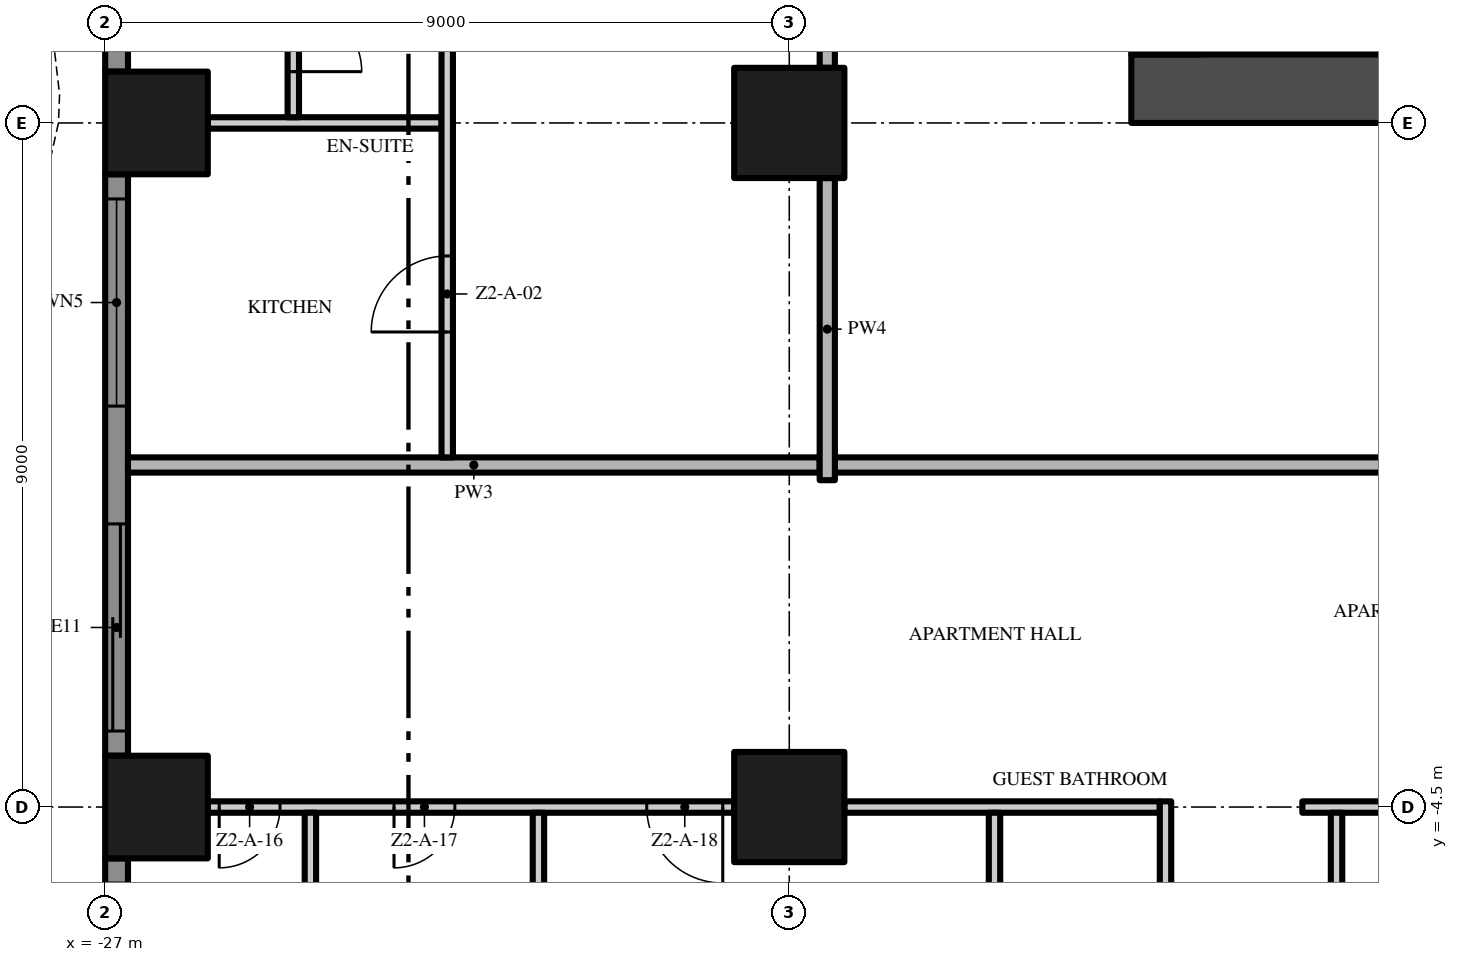
"""IFC4 building model, lengths in metres.
Left out: names, types, materials, properties, quantities, classifications, styles, units other than length and angle.
Written with IfcOpenShell. Run it as: python <this file> out.ifc"""

import sys

from ifc_helpers import new_model, si_unit, direction, frame, frame_2d, origin, origin_2d, place, context, subcontext, project, spatial, polyline, rectangle, outline, extrude, element, fill, save


model = new_model("IFC4")
c1 = context("Model", 3, precision=1e-05, world=origin(), true_north=direction((0.0, 1.0)))
c2 = subcontext(c1, "Body", "Model", "MODEL_VIEW")
j1 = project(units=[si_unit("LENGTHUNIT", "METRE"), si_unit("PLANEANGLEUNIT", "RADIAN")], contexts=[c1])
p1 = place(None, origin())
s1 = spatial("IfcSite", under=j1, at=p1, CompositionType="ELEMENT")
p2 = place(p1, origin())
s2 = spatial("IfcBuilding", under=s1, at=p2, CompositionType="ELEMENT")
p3 = place(p2, frame((0.0, 0.0, 73.2)))
s3 = spatial("IfcBuildingStorey", under=s2, at=p3, CompositionType="ELEMENT", Elevation=73.2)
p4 = place(p3, frame((-13.5, 4.95, -0.3), z_axis=(0.0, 0.0, 1.0), x_axis=(1.0, 0.0, 0.0)))
e1 = element("IfcWall", 1, at=p4, inside=s3, PredefinedType="SHEAR", context=c2, shape_type="SweptSolid", body=[
    extrude(rectangle(XDim=27.0, YDim=0.9, at=frame_2d((13.5, 0.0))), origin(), (0.0, 0.0, 1.0), 3.8),
])
p5 = place(p4, frame((12.0, 0.0, 0.3)))
e2 = element("IfcOpeningElement", 2, at=p5, cuts=e1, PredefinedType="OPENING", context=c2, shape_type="SweptSolid", body=[
    extrude(rectangle(XDim=3.0, YDim=2.4, at=frame_2d((1.5, 1.2))), frame((0.0, 0.46, 0.0), z_axis=(0.0, -1.0, 0.0), x_axis=(1.0, 0.0, 0.0)), (0.0, 0.0, 1.0), 0.92),
])
p6 = place(p4, frame((4.9, 0.0, 0.3)))
e3 = element("IfcOpeningElement", 3, at=p6, cuts=e1, PredefinedType="OPENING", context=c2, shape_type="SweptSolid", body=[
    extrude(rectangle(XDim=1.2, YDim=2.2, at=frame_2d((0.6, 1.1))), frame((0.0, 0.46, 0.0), z_axis=(0.0, -1.0, 0.0), x_axis=(1.0, 0.0, 0.0)), (0.0, 0.0, 1.0), 0.92),
])
p7 = place(p4, frame((20.75, 0.0, 0.3)))
e4 = element("IfcOpeningElement", 4, at=p7, cuts=e1, PredefinedType="OPENING", context=c2, shape_type="SweptSolid", body=[
    extrude(rectangle(XDim=1.5, YDim=2.2, at=frame_2d((0.75, 1.1))), frame((0.0, 0.46, 0.0), z_axis=(0.0, -1.0, 0.0), x_axis=(1.0, 0.0, 0.0)), (0.0, 0.0, 1.0), 0.92),
])
p8 = place(p4, frame((17.4, 0.0, 0.3)))
e5 = element("IfcOpeningElement", 5, at=p8, cuts=e1, PredefinedType="OPENING", context=c2, shape_type="SweptSolid", body=[
    extrude(rectangle(XDim=1.2, YDim=2.2, at=frame_2d((0.6, 1.1))), frame((0.0, 0.46, 0.0), z_axis=(0.0, -1.0, 0.0), x_axis=(1.0, 0.0, 0.0)), (0.0, 0.0, 1.0), 0.92),
])
p9 = place(p3, frame((-13.05, 21.6, -0.3), z_axis=(0.0, 0.0, 1.0), x_axis=(0.0, -1.0, 0.0)))
e6 = element("IfcWall", 6, at=p9, inside=s3, PredefinedType="SHEAR", context=c2, shape_type="SweptSolid", body=[
    extrude(rectangle(XDim=16.2, YDim=0.9, at=frame_2d((8.1, 0.0))), origin(), (0.0, 0.0, 1.0), 3.8),
])
p10 = place(p9, frame((9.0, 0.0, 0.3)))
e7 = element("IfcOpeningElement", 7, at=p10, cuts=e6, PredefinedType="OPENING", context=c2, shape_type="SweptSolid", body=[
    extrude(rectangle(XDim=1.2, YDim=2.2, at=frame_2d((0.6, 1.1))), frame((0.0, 0.46, 0.0), z_axis=(0.0, -1.0, 0.0), x_axis=(1.0, 0.0, 0.0)), (0.0, 0.0, 1.0), 0.92),
])
for number, where, z_axis, x_axis in (
    (8, (-18.0, -4.5, 0.0), (0.0, 0.0, 1.0), (1.0, 0.0, 0.0)),
    (9, (-18.0, 4.5, 0.0), (0.0, 0.0, 1.0), (1.0, 0.0, 0.0)),
):
    element("IfcColumn", number, at=place(p3, frame(where, z_axis=z_axis, x_axis=x_axis)), inside=s3, PredefinedType="COLUMN", context=c2, shape_type="SweptSolid", body=[
        extrude(rectangle(XDim=1.45, YDim=1.45, at=origin_2d()), origin(), (0.0, 0.0, 1.0), 3.5),
    ])
for number, where, z_axis, x_axis in (
    (10, (-26.325, -4.5, 0.0), (0.0, 0.0, 1.0), (1.0, 0.0, 0.0)),
    (11, (-26.325, 4.5, 0.0), (0.0, 0.0, 1.0), (1.0, 0.0, 0.0)),
):
    element("IfcColumn", number, at=place(p3, frame(where, z_axis=z_axis, x_axis=x_axis)), inside=s3, PredefinedType="COLUMN", context=c2, shape_type="SweptSolid", body=[
        extrude(rectangle(XDim=1.35, YDim=1.35, at=origin_2d()), origin(), (0.0, 0.0, 1.0), 3.5),
    ])
p11 = place(p3, frame((-26.85, 5.175, 0.0), z_axis=(0.0, 0.0, 1.0), x_axis=(0.0, 1.0, 0.0)))
e12 = element("IfcWall", 12, at=p11, inside=s3, PredefinedType="SOLIDWALL", context=c2, shape_type="SweptSolid", body=[
    extrude(rectangle(XDim=7.65, YDim=0.3, at=frame_2d((3.825, 0.0))), origin(), (0.0, 0.0, 1.0), 3.5),
])
p12 = place(p11, frame((4.6, 0.0, 0.0)))
e13 = element("IfcOpeningElement", 13, at=p12, cuts=e12, PredefinedType="OPENING", context=c2, shape_type="SweptSolid", body=[
    extrude(rectangle(XDim=2.725, YDim=2.4, at=frame_2d((1.363, 1.2))), frame((0.0, 0.16, 0.0), z_axis=(0.0, -1.0, 0.0), x_axis=(1.0, 0.0, 0.0)), (0.0, 0.0, 1.0), 0.32),
])
p13 = place(p11, frame((0.325, 0.0, 0.45)))
e14 = element("IfcOpeningElement", 14, at=p13, cuts=e12, PredefinedType="OPENING", context=c2, shape_type="SweptSolid", body=[
    extrude(rectangle(XDim=2.725, YDim=2.65, at=frame_2d((1.363, 1.325))), frame((0.0, 0.16, 0.0), z_axis=(0.0, -1.0, 0.0), x_axis=(1.0, 0.0, 0.0)), (0.0, 0.0, 1.0), 0.32),
])
p14 = place(p3, frame((-26.85, -3.825, 0.0), z_axis=(0.0, 0.0, 1.0), x_axis=(0.0, 1.0, 0.0)))
e15 = element("IfcWall", 15, at=p14, inside=s3, PredefinedType="SOLIDWALL", context=c2, shape_type="SweptSolid", body=[
    extrude(rectangle(XDim=7.65, YDim=0.3, at=frame_2d((3.825, 0.0))), origin(), (0.0, 0.0, 1.0), 3.5),
])
p15 = place(p14, frame((4.6, 0.0, 0.45)))
e16 = element("IfcOpeningElement", 16, at=p15, cuts=e15, PredefinedType="OPENING", context=c2, shape_type="SweptSolid", body=[
    extrude(rectangle(XDim=2.725, YDim=2.65, at=frame_2d((1.363, 1.325))), frame((0.0, 0.16, 0.0), z_axis=(0.0, -1.0, 0.0), x_axis=(1.0, 0.0, 0.0)), (0.0, 0.0, 1.0), 0.32),
])
p16 = place(p14, frame((0.325, 0.0, 0.0)))
e17 = element("IfcOpeningElement", 17, at=p16, cuts=e15, PredefinedType="OPENING", context=c2, shape_type="SweptSolid", body=[
    extrude(rectangle(XDim=2.725, YDim=2.4, at=frame_2d((1.363, 1.2))), frame((0.0, 0.16, 0.0), z_axis=(0.0, -1.0, 0.0), x_axis=(1.0, 0.0, 0.0)), (0.0, 0.0, 1.0), 0.32),
])
p17 = place(p3, frame((-26.85, -12.825, 0.0), z_axis=(0.0, 0.0, 1.0), x_axis=(0.0, 1.0, 0.0)))
e18 = element("IfcWall", 18, at=p17, inside=s3, PredefinedType="SOLIDWALL", context=c2, shape_type="SweptSolid", body=[
    extrude(rectangle(XDim=7.65, YDim=0.3, at=frame_2d((3.825, 0.0))), origin(), (0.0, 0.0, 1.0), 3.5),
])
p18 = place(p17, frame((4.6, 0.0, 0.45)))
e19 = element("IfcOpeningElement", 19, at=p18, cuts=e18, PredefinedType="OPENING", context=c2, shape_type="SweptSolid", body=[
    extrude(rectangle(XDim=2.725, YDim=2.65, at=frame_2d((1.363, 1.325))), frame((0.0, 0.16, 0.0), z_axis=(0.0, -1.0, 0.0), x_axis=(1.0, 0.0, 0.0)), (0.0, 0.0, 1.0), 0.32),
])
p19 = place(p17, frame((0.325, 0.0, 0.45)))
e20 = element("IfcOpeningElement", 20, at=p19, cuts=e18, PredefinedType="OPENING", context=c2, shape_type="SweptSolid", body=[
    extrude(rectangle(XDim=2.725, YDim=2.65, at=frame_2d((1.363, 1.325))), frame((0.0, 0.16, 0.0), z_axis=(0.0, -1.0, 0.0), x_axis=(1.0, 0.0, 0.0)), (0.0, 0.0, 1.0), 0.32),
])
p20 = place(p3, origin())
e21 = element("IfcWall", 21, at=p20, inside=s3, PredefinedType="USERDEFINED", context=c2, shape_type="SweptSolid", body=[
    extrude(outline(polyline([(-27.951, 18.0), (-28.612, 16.5), (-29.345, 15.0), (-29.869, 13.5), (-30.0, 12.375), (-29.985, 12.0), (-29.649, 10.5), (-28.988, 9.0), (-28.255, 7.5), (-27.731, 6.0), (-27.6, 4.875), (-27.615, 4.5), (-27.951, 3.0), (-28.612, 1.5), (-29.345, 0.0), (-29.869, -1.5), (-30.0, -2.625), (-29.985, -3.0), (-29.649, -4.5), (-28.988, -6.0), (-28.255, -7.5), (-27.731, -9.0), (-27.6, -10.125), (-27.615, -10.5), (-27.951, -12.0), (-28.612, -13.5), (-29.345, -15.0), (-29.869, -16.5), (-30.0, -17.625), (-29.985, -18.0), (-29.735, -17.99), (-29.749, -17.635), (-29.624, -16.556), (-29.114, -15.096), (-28.385, -13.605), (-27.713, -12.079), (-27.366, -10.533), (-27.349, -10.115), (-27.486, -8.944), (-28.024, -7.404), (-28.761, -5.895), (-29.41, -4.421), (-29.736, -2.967), (-29.749, -2.635), (-29.624, -1.556), (-29.114, -0.096), (-28.385, 1.395), (-27.713, 2.921), (-27.366, 4.467), (-27.349, 4.885), (-27.486, 6.056), (-28.024, 7.596), (-28.761, 9.105), (-29.41, 10.579), (-29.736, 12.033), (-29.749, 12.365), (-29.624, 13.444), (-29.114, 14.904), (-28.385, 16.395), (-27.723, 17.899), (-27.951, 18.0)])), origin(), (0.0, 0.0, 1.0), 0.9),
])
p21 = place(p3, frame((-18.725, -4.5, 0.0), z_axis=(0.0, 0.0, 1.0), x_axis=(-1.0, 0.0, 0.0)))
e22 = element("IfcWall", 22, at=p21, inside=s3, PredefinedType="PARTITIONING", context=c2, shape_type="SweptSolid", body=[
    extrude(rectangle(XDim=6.925, YDim=0.15, at=frame_2d((3.462, 0.0))), origin(), (0.0, 0.0, 1.0), 3.5),
])
p22 = place(p21, frame((5.975, 0.0, 0.0)))
e23 = element("IfcOpeningElement", 23, at=p22, cuts=e22, PredefinedType="OPENING", context=c2, shape_type="SweptSolid", body=[
    extrude(rectangle(XDim=0.8, YDim=2.0, at=frame_2d((0.4, 1.0))), frame((0.0, 0.085, 0.0), z_axis=(0.0, -1.0, 0.0), x_axis=(1.0, 0.0, 0.0)), (0.0, 0.0, 1.0), 0.17),
])
p23 = place(p21, frame((3.675, 0.0, 0.0)))
e24 = element("IfcOpeningElement", 24, at=p23, cuts=e22, PredefinedType="OPENING", context=c2, shape_type="SweptSolid", body=[
    extrude(rectangle(XDim=0.8, YDim=2.0, at=frame_2d((0.4, 1.0))), frame((0.0, 0.085, 0.0), z_axis=(0.0, -1.0, 0.0), x_axis=(1.0, 0.0, 0.0)), (0.0, 0.0, 1.0), 0.17),
])
p24 = place(p21, frame((0.15, 0.0, 0.0)))
e25 = element("IfcOpeningElement", 25, at=p24, cuts=e22, PredefinedType="OPENING", context=c2, shape_type="SweptSolid", body=[
    extrude(rectangle(XDim=1.0, YDim=2.4, at=frame_2d((0.5, 1.2))), frame((0.0, 0.085, 0.0), z_axis=(0.0, -1.0, 0.0), x_axis=(1.0, 0.0, 0.0)), (0.0, 0.0, 1.0), 0.17),
])
p25 = place(p3, frame((-17.275, -4.5, 0.0), z_axis=(0.0, 0.0, 1.0), x_axis=(1.0, 0.0, 0.0)))
e26 = element("IfcWall", 26, at=p25, inside=s3, PredefinedType="PARTITIONING", context=c2, shape_type="SweptSolid", body=[
    extrude(rectangle(XDim=4.15, YDim=0.15, at=frame_2d((2.075, 0.0))), origin(), (0.0, 0.0, 1.0), 3.5),
])
p26 = place(p3, frame((-11.25, -4.5, 0.0), z_axis=(0.0, 0.0, 1.0), x_axis=(1.0, 0.0, 0.0)))
e27 = element("IfcWall", 27, at=p26, inside=s3, PredefinedType="PARTITIONING", context=c2, shape_type="SweptSolid", body=[
    extrude(rectangle(XDim=1.525, YDim=0.15, at=frame_2d((0.762, 0.0))), origin(), (0.0, 0.0, 1.0), 3.5),
])
p27 = place(p3, frame((-0.1, 0.0, 0.0), z_axis=(0.0, 0.0, 1.0), x_axis=(-1.0, 0.0, 0.0)))
e28 = element("IfcWall", 28, at=p27, inside=s3, PredefinedType="PARTITIONING", context=c2, shape_type="SweptSolid", body=[
    extrude(rectangle(XDim=17.3, YDim=0.2, at=frame_2d((8.65, 0.0))), origin(), (0.0, 0.0, 1.0), 3.5),
])
p28 = place(p27, frame((8.15, 0.0, 0.0)))
e29 = element("IfcOpeningElement", 29, at=p28, cuts=e28, PredefinedType="OPENING", context=c2, shape_type="SweptSolid", body=[
    extrude(rectangle(XDim=1.5, YDim=2.4, at=frame_2d((0.75, 1.2))), frame((0.0, 0.11, 0.0), z_axis=(0.0, -1.0, 0.0), x_axis=(1.0, 0.0, 0.0)), (0.0, 0.0, 1.0), 0.22),
])
p29 = place(p3, frame((-26.7, 0.0, 0.0), z_axis=(0.0, 0.0, 1.0), x_axis=(1.0, 0.0, 0.0)))
e30 = element("IfcWall", 30, at=p29, inside=s3, PredefinedType="PARTITIONING", context=c2, shape_type="SweptSolid", body=[
    extrude(rectangle(XDim=9.1, YDim=0.2, at=frame_2d((4.55, 0.0))), origin(), (0.0, 0.0, 1.0), 3.5),
])
p30 = place(p3, frame((-25.65, 4.5, 0.0), z_axis=(0.0, 0.0, 1.0), x_axis=(1.0, 0.0, 0.0)))
e31 = element("IfcWall", 31, at=p30, inside=s3, PredefinedType="PARTITIONING", context=c2, shape_type="SweptSolid", body=[
    extrude(rectangle(XDim=3.075, YDim=0.15, at=frame_2d((1.538, 0.0))), origin(), (0.0, 0.0, 1.0), 3.5),
])
p31 = place(p3, frame((-24.525, 6.825, 0.0), z_axis=(0.0, 0.0, 1.0), x_axis=(0.0, -1.0, 0.0)))
e32 = element("IfcWall", 32, at=p31, inside=s3, PredefinedType="PARTITIONING", context=c2, shape_type="SweptSolid", body=[
    extrude(rectangle(XDim=2.25, YDim=0.15, at=frame_2d((1.125, 0.0))), origin(), (0.0, 0.0, 1.0), 3.5),
])
p32 = place(p31, frame((0.75, 0.0, 0.0)))
e33 = element("IfcOpeningElement", 33, at=p32, cuts=e32, PredefinedType="OPENING", context=c2, shape_type="SweptSolid", body=[
    extrude(rectangle(XDim=0.9, YDim=2.1, at=frame_2d((0.45, 1.05))), frame((0.0, 0.085, 0.0), z_axis=(0.0, -1.0, 0.0), x_axis=(1.0, 0.0, 0.0)), (0.0, 0.0, 1.0), 0.17),
])
p33 = place(p3, frame((-24.3, -8.925, 0.0), z_axis=(0.0, 0.0, 1.0), x_axis=(0.0, 1.0, 0.0)))
e34 = element("IfcWall", 34, at=p33, inside=s3, PredefinedType="PARTITIONING", context=c2, shape_type="SweptSolid", body=[
    extrude(rectangle(XDim=4.35, YDim=0.15, at=frame_2d((2.175, 0.0))), origin(), (0.0, 0.0, 1.0), 3.5),
])
p34 = place(p3, frame((-22.5, 0.1, 0.0), z_axis=(0.0, 0.0, 1.0), x_axis=(0.0, 1.0, 0.0)))
e35 = element("IfcWall", 35, at=p34, inside=s3, PredefinedType="PARTITIONING", context=c2, shape_type="SweptSolid", body=[
    extrude(rectangle(XDim=17.225, YDim=0.15, at=frame_2d((8.613, 0.0))), origin(), (0.0, 0.0, 1.0), 3.5),
])
p35 = place(p34, frame((1.65, 0.0, 0.0)))
e36 = element("IfcOpeningElement", 36, at=p35, cuts=e35, PredefinedType="OPENING", context=c2, shape_type="SweptSolid", body=[
    extrude(rectangle(XDim=1.0, YDim=2.4, at=frame_2d((0.5, 1.2))), frame((0.0, 0.085, 0.0), z_axis=(0.0, -1.0, 0.0), x_axis=(1.0, 0.0, 0.0)), (0.0, 0.0, 1.0), 0.17),
])
p36 = place(p34, frame((7.25, 0.0, 0.0)))
e37 = element("IfcOpeningElement", 37, at=p36, cuts=e35, PredefinedType="OPENING", context=c2, shape_type="SweptSolid", body=[
    extrude(rectangle(XDim=1.0, YDim=2.4, at=frame_2d((0.5, 1.2))), frame((0.0, 0.085, 0.0), z_axis=(0.0, -1.0, 0.0), x_axis=(1.0, 0.0, 0.0)), (0.0, 0.0, 1.0), 0.17),
])
p37 = place(p34, frame((9.5, 0.0, 0.0)))
e38 = element("IfcOpeningElement", 38, at=p37, cuts=e35, PredefinedType="OPENING", context=c2, shape_type="SweptSolid", body=[
    extrude(rectangle(XDim=1.0, YDim=2.4, at=frame_2d((0.5, 1.2))), frame((0.0, 0.085, 0.0), z_axis=(0.0, -1.0, 0.0), x_axis=(1.0, 0.0, 0.0)), (0.0, 0.0, 1.0), 0.17),
])
p38 = place(p34, frame((16.075, 0.0, 0.0)))
e39 = element("IfcOpeningElement", 39, at=p38, cuts=e35, PredefinedType="OPENING", context=c2, shape_type="SweptSolid", body=[
    extrude(rectangle(XDim=1.0, YDim=2.4, at=frame_2d((0.5, 1.2))), frame((0.0, 0.085, 0.0), z_axis=(0.0, -1.0, 0.0), x_axis=(1.0, 0.0, 0.0)), (0.0, 0.0, 1.0), 0.17),
])
p39 = place(p3, frame((-21.3, -8.925, 0.0), z_axis=(0.0, 0.0, 1.0), x_axis=(0.0, 1.0, 0.0)))
e40 = element("IfcWall", 40, at=p39, inside=s3, PredefinedType="PARTITIONING", context=c2, shape_type="SweptSolid", body=[
    extrude(rectangle(XDim=4.35, YDim=0.15, at=frame_2d((2.175, 0.0))), origin(), (0.0, 0.0, 1.0), 3.5),
])
p40 = place(p3, frame((-17.5, -0.2, 0.0), z_axis=(0.0, 0.0, 1.0), x_axis=(0.0, 1.0, 0.0)))
e41 = element("IfcWall", 41, at=p40, inside=s3, PredefinedType="PARTITIONING", context=c2, shape_type="SweptSolid", body=[
    extrude(rectangle(XDim=3.975, YDim=0.2, at=frame_2d((1.988, 0.0))), origin(), (0.0, 0.0, 1.0), 3.5),
])
p41 = place(p3, frame((-17.5, 5.225, 0.0), z_axis=(0.0, 0.0, 1.0), x_axis=(0.0, 1.0, 0.0)))
e42 = element("IfcWall", 42, at=p41, inside=s3, PredefinedType="PARTITIONING", context=c2, shape_type="SweptSolid", body=[
    extrude(rectangle(XDim=7.55, YDim=0.2, at=frame_2d((3.775, 0.0))), origin(), (0.0, 0.0, 1.0), 3.5),
])
p42 = place(p3, frame((-15.3, -8.925, 0.0), z_axis=(0.0, 0.0, 1.0), x_axis=(0.0, 1.0, 0.0)))
e43 = element("IfcWall", 43, at=p42, inside=s3, PredefinedType="PARTITIONING", context=c2, shape_type="SweptSolid", body=[
    extrude(rectangle(XDim=4.35, YDim=0.15, at=frame_2d((2.175, 0.0))), origin(), (0.0, 0.0, 1.0), 3.5),
])
p43 = place(p3, frame((-13.05, -9.075, 0.0), z_axis=(0.0, 0.0, 1.0), x_axis=(0.0, 1.0, 0.0)))
e44 = element("IfcWall", 44, at=p43, inside=s3, PredefinedType="PARTITIONING", context=c2, shape_type="SweptSolid", body=[
    extrude(rectangle(XDim=4.65, YDim=0.15, at=frame_2d((2.325, 0.0))), origin(), (0.0, 0.0, 1.0), 3.5),
])
p44 = place(p43, frame((1.875, 0.0, 0.0)))
e45 = element("IfcOpeningElement", 45, at=p44, cuts=e44, PredefinedType="OPENING", context=c2, shape_type="SweptSolid", body=[
    extrude(rectangle(XDim=0.9, YDim=2.1, at=frame_2d((0.45, 1.05))), frame((0.0, 0.085, 0.0), z_axis=(0.0, -1.0, 0.0), x_axis=(1.0, 0.0, 0.0)), (0.0, 0.0, 1.0), 0.17),
])
p45 = place(p3, frame((-10.8, -9.075, 0.0), z_axis=(0.0, 0.0, 1.0), x_axis=(0.0, 1.0, 0.0)))
e46 = element("IfcWall", 46, at=p45, inside=s3, PredefinedType="PARTITIONING", context=c2, shape_type="SweptSolid", body=[
    extrude(rectangle(XDim=4.5, YDim=0.15, at=frame_2d((2.25, 0.0))), origin(), (0.0, 0.0, 1.0), 3.5),
])
p46 = place(p15, origin())
e47 = element("IfcWindow", 47, at=p46, inside=s3, PartitioningType="SINGLE_PANEL", PredefinedType="WINDOW", context=c2, shape_type="SweptSolid", body=[
    extrude(rectangle(XDim=2.725, YDim=2.65, at=frame_2d((1.363, 1.325))), frame((0.0, 0.03, 0.0), z_axis=(0.0, -1.0, 0.0), x_axis=(1.0, 0.0, 0.0)), (0.0, 0.0, 1.0), 0.06),
])
fill(e16, e47)
p47 = place(p16, origin())
e48 = element("IfcDoor", 48, at=p47, inside=s3, OperationType="SINGLE_SWING_LEFT", PredefinedType="DOOR", context=c2, shape_type="SweptSolid", body=[
    extrude(rectangle(XDim=2.725, YDim=2.4, at=frame_2d((1.363, 1.2))), frame((0.0, 0.025, 0.0), z_axis=(0.0, -1.0, 0.0), x_axis=(1.0, 0.0, 0.0)), (0.0, 0.0, 1.0), 0.05),
])
fill(e17, e48)
p48 = place(p35, origin())
e49 = element("IfcDoor", 49, at=p48, inside=s3, OperationType="SINGLE_SWING_LEFT", PredefinedType="DOOR", context=c2, shape_type="SweptSolid", body=[
    extrude(rectangle(XDim=1.0, YDim=2.4, at=frame_2d((0.5, 1.2))), frame((0.0, 0.025, 0.0), z_axis=(0.0, -1.0, 0.0), x_axis=(1.0, 0.0, 0.0)), (0.0, 0.0, 1.0), 0.05),
])
fill(e36, e49)
p49 = place(p32, origin())
e50 = element("IfcDoor", 50, at=p49, inside=s3, OperationType="SINGLE_SWING_RIGHT", PredefinedType="DOOR", context=c2, shape_type="SweptSolid", body=[
    extrude(rectangle(XDim=0.9, YDim=2.1, at=frame_2d((0.45, 1.05))), frame((0.0, 0.025, 0.0), z_axis=(0.0, -1.0, 0.0), x_axis=(1.0, 0.0, 0.0)), (0.0, 0.0, 1.0), 0.05),
])
fill(e33, e50)
p50 = place(p22, origin())
e51 = element("IfcDoor", 51, at=p50, inside=s3, OperationType="SINGLE_SWING_RIGHT", PredefinedType="DOOR", context=c2, shape_type="SweptSolid", body=[
    extrude(rectangle(XDim=0.8, YDim=2.0, at=frame_2d((0.4, 1.0))), frame((0.0, 0.025, 0.0), z_axis=(0.0, -1.0, 0.0), x_axis=(1.0, 0.0, 0.0)), (0.0, 0.0, 1.0), 0.05),
])
fill(e23, e51)
p51 = place(p23, origin())
e52 = element("IfcDoor", 52, at=p51, inside=s3, OperationType="SINGLE_SWING_RIGHT", PredefinedType="DOOR", context=c2, shape_type="SweptSolid", body=[
    extrude(rectangle(XDim=0.8, YDim=2.0, at=frame_2d((0.4, 1.0))), frame((0.0, 0.025, 0.0), z_axis=(0.0, -1.0, 0.0), x_axis=(1.0, 0.0, 0.0)), (0.0, 0.0, 1.0), 0.05),
])
fill(e24, e52)
p52 = place(p24, origin())
e53 = element("IfcDoor", 53, at=p52, inside=s3, OperationType="SINGLE_SWING_LEFT", PredefinedType="DOOR", context=c2, shape_type="SweptSolid", body=[
    extrude(rectangle(XDim=1.0, YDim=2.4, at=frame_2d((0.5, 1.2))), frame((0.0, 0.025, 0.0), z_axis=(0.0, -1.0, 0.0), x_axis=(1.0, 0.0, 0.0)), (0.0, 0.0, 1.0), 0.05),
])
fill(e25, e53)
save(model, sys.argv[1])
